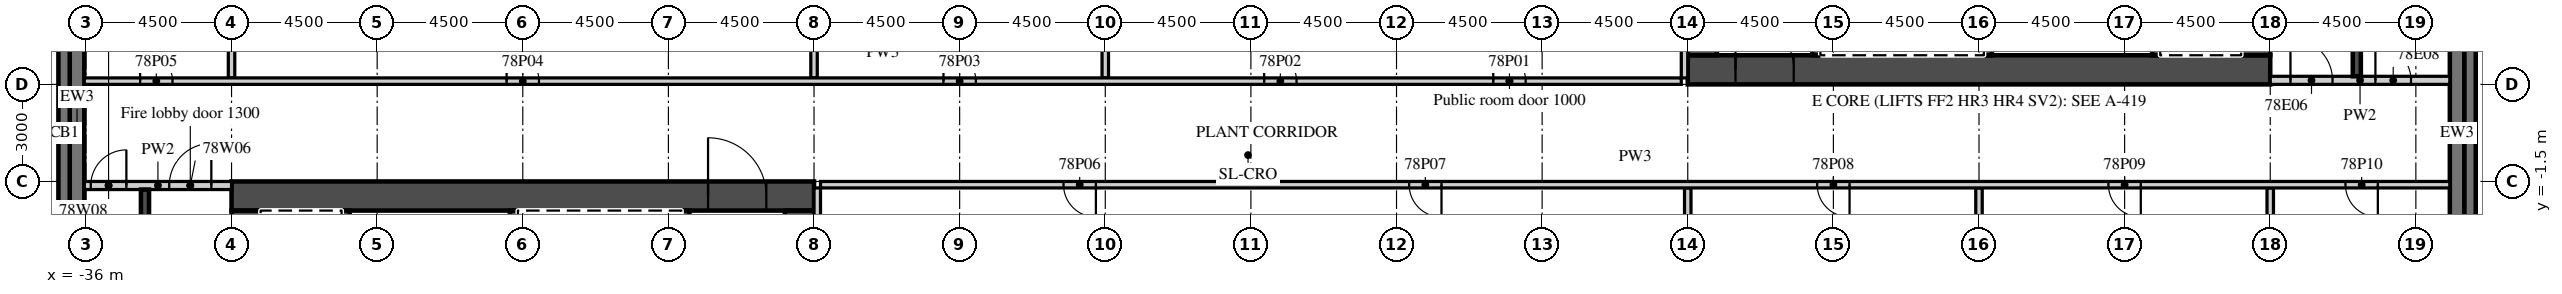
"""IFC4 building model, lengths in metres.
Left out: names, types, materials, properties, quantities, classifications, styles, units other than length and angle.
Written with IfcOpenShell. Run it as: python <this file> out.ifc"""

import sys

from ifc_helpers import new_model, si_unit, direction, frame, frame_2d, origin, place, context, subcontext, project, spatial, polyline, rectangle, outline, extrude, element, fill, save


model = new_model("IFC4")
c1 = context("Model", 3, precision=1e-05, world=origin(), true_north=direction((0.0, 1.0)))
c2 = subcontext(c1, "Body", "Model", "MODEL_VIEW")
j1 = project(units=[si_unit("LENGTHUNIT", "METRE"), si_unit("PLANEANGLEUNIT", "RADIAN")], contexts=[c1])
p1 = place(None, origin())
s1 = spatial("IfcSite", under=j1, at=p1, CompositionType="ELEMENT")
p2 = place(p1, origin())
s2 = spatial("IfcBuilding", under=s1, at=p2, CompositionType="ELEMENT")
p3 = place(p2, frame((0.0, 0.0, 308.1)))
s3 = spatial("IfcBuildingStorey", under=s2, at=p3, CompositionType="ELEMENT", Elevation=308.1)
for number, where, z_axis, x_axis in (
    (1, (37.275, -14.5, 0.0), (0.0, 0.0, 1.0), (0.0, 1.0, 0.0)),
    (2, (-36.275, 14.5, 0.0), (0.0, 0.0, 1.0), (0.0, -1.0, 0.0)),
):
    element("IfcWall", number, at=place(p3, frame(where, z_axis=z_axis, x_axis=x_axis)), inside=s3, PredefinedType="SOLIDWALL", context=c2, shape_type="SweptSolid", body=[
        extrude(rectangle(XDim=29.0, YDim=0.45, at=frame_2d((14.5, 0.0))), origin(), (0.0, 0.0, 1.0), 5.1),
    ])
p4 = place(p3, origin())
e3 = element("IfcWall", 3, at=p4, inside=s3, PredefinedType="SOLIDWALL", context=c2, shape_type="SweptSolid", body=[
    extrude(outline(polyline([(37.5, -3.943), (37.85, -7.578), (37.85, 14.546), (37.5, 14.5), (37.5, -3.943)])), origin(), (0.0, 0.0, 1.0), 2.0),
])
p5 = place(p3, origin())
e4 = element("IfcWall", 4, at=p5, inside=s3, PredefinedType="SOLIDWALL", context=c2, shape_type="SweptSolid", body=[
    extrude(outline(polyline([(-36.5, 14.5), (-36.85, 14.546), (-36.85, -14.546), (-36.5, -14.5), (-36.5, 14.5)])), origin(), (0.0, 0.0, 1.0), 2.0),
])
p6 = place(p3, frame((-31.5, -1.95, 0.0), z_axis=(0.0, 0.0, 1.0), x_axis=(1.0, 0.0, 0.0)))
e5 = element("IfcWall", 5, at=p6, inside=s3, PredefinedType="SHEAR", context=c2, shape_type="SweptSolid", body=[
    extrude(rectangle(XDim=18.0, YDim=0.9, at=frame_2d((9.0, 0.0))), origin(), (0.0, 0.0, 1.0), 5.1),
])
p7 = place(p6, frame((14.725, 0.0, 0.0)))
e6 = element("IfcOpeningElement", 6, at=p7, cuts=e5, PredefinedType="OPENING", context=c2, shape_type="SweptSolid", body=[
    extrude(rectangle(XDim=1.8, YDim=2.1, at=frame_2d((0.9, 1.05))), frame((0.0, 0.46, 0.0), z_axis=(0.0, -1.0, 0.0), x_axis=(1.0, 0.0, 0.0)), (0.0, 0.0, 1.0), 0.92),
])
p8 = place(p3, frame((-31.05, -15.2, 0.0), z_axis=(0.0, 0.0, 1.0), x_axis=(0.0, 1.0, 0.0)))
e7 = element("IfcWall", 7, at=p8, inside=s3, PredefinedType="SHEAR", context=c2, shape_type="SweptSolid", body=[
    extrude(rectangle(XDim=12.8, YDim=0.9, at=frame_2d((6.4, 0.0))), origin(), (0.0, 0.0, 1.0), 5.1),
])
p9 = place(p8, frame((11.5, 0.0, 0.0)))
e8 = element("IfcOpeningElement", 8, at=p9, cuts=e7, PredefinedType="OPENING", context=c2, shape_type="SweptSolid", body=[
    extrude(rectangle(XDim=1.1, YDim=2.1, at=frame_2d((0.55, 1.05))), frame((0.0, 0.46, 0.0), z_axis=(0.0, -1.0, 0.0), x_axis=(1.0, 0.0, 0.0)), (0.0, 0.0, 1.0), 0.92),
])
p10 = place(p3, frame((-13.95, -14.6, 0.0), z_axis=(0.0, 0.0, 1.0), x_axis=(0.0, 1.0, 0.0)))
e9 = element("IfcWall", 9, at=p10, inside=s3, PredefinedType="SHEAR", context=c2, shape_type="SweptSolid", body=[
    extrude(rectangle(XDim=12.2, YDim=0.9, at=frame_2d((6.1, 0.0))), origin(), (0.0, 0.0, 1.0), 5.1),
])
p11 = place(p3, frame((-17.475, -5.55, 0.0), z_axis=(0.0, 0.0, 1.0), x_axis=(0.0, 1.0, 0.0)))
e10 = element("IfcWall", 10, at=p11, inside=s3, PredefinedType="SHEAR", context=c2, shape_type="SweptSolid", body=[
    extrude(rectangle(XDim=3.15, YDim=0.25, at=frame_2d((1.575, 0.0))), origin(), (0.0, 0.0, 1.0), 5.1),
])
for number, where, z_axis, x_axis in (
    (11, (-27.975, -5.3, 0.0), (0.0, 0.0, 1.0), (0.0, 1.0, 0.0)),
    (12, (-22.775, -5.3, 0.0), (0.0, 0.0, 1.0), (0.0, 1.0, 0.0)),
):
    element("IfcWall", number, at=place(p3, frame(where, z_axis=z_axis, x_axis=x_axis)), inside=s3, PredefinedType="SHEAR", context=c2, shape_type="SweptSolid", body=[
        extrude(rectangle(XDim=2.9, YDim=0.25, at=frame_2d((1.45, 0.0))), origin(), (0.0, 0.0, 1.0), 5.1),
    ])
p12 = place(p3, frame((-36.05, -1.625, 0.0), z_axis=(0.0, 0.0, 1.0), x_axis=(1.0, 0.0, 0.0)))
e13 = element("IfcWall", 13, at=p12, inside=s3, PredefinedType="PARTITIONING", context=c2, shape_type="SweptSolid", body=[
    extrude(rectangle(XDim=4.55, YDim=0.25, at=frame_2d((2.275, 0.0))), origin(), (0.0, 0.0, 1.0), 5.1),
])
p13 = place(p12, frame((2.625, 0.0, 0.0)))
e14 = element("IfcOpeningElement", 14, at=p13, cuts=e13, PredefinedType="OPENING", context=c2, shape_type="SweptSolid", body=[
    extrude(rectangle(XDim=1.3, YDim=2.1, at=frame_2d((0.65, 1.05))), frame((0.0, 0.135, 0.0), z_axis=(0.0, -1.0, 0.0), x_axis=(1.0, 0.0, 0.0)), (0.0, 0.0, 1.0), 0.27),
])
p14 = place(p12, frame((0.2, 0.0, 0.0)))
e15 = element("IfcOpeningElement", 15, at=p14, cuts=e13, PredefinedType="OPENING", context=c2, shape_type="SweptSolid", body=[
    extrude(rectangle(XDim=1.1, YDim=2.1, at=frame_2d((0.55, 1.05))), frame((0.0, 0.135, 0.0), z_axis=(0.0, -1.0, 0.0), x_axis=(1.0, 0.0, 0.0)), (0.0, 0.0, 1.0), 0.27),
])
p15 = place(p3, frame((-34.175, -4.05, 0.0), z_axis=(0.0, 0.0, 1.0), x_axis=(0.0, 1.0, 0.0)))
e16 = element("IfcWall", 16, at=p15, inside=s3, PredefinedType="SHEAR", context=c2, shape_type="SweptSolid", body=[
    extrude(rectangle(XDim=2.3, YDim=0.25, at=frame_2d((1.15, 0.0))), origin(), (0.0, 0.0, 1.0), 5.1),
])
p16 = place(p3, frame((13.5, 1.95, 0.0), z_axis=(0.0, 0.0, 1.0), x_axis=(1.0, 0.0, 0.0)))
e17 = element("IfcWall", 17, at=p16, inside=s3, PredefinedType="SHEAR", context=c2, shape_type="SweptSolid", body=[
    extrude(rectangle(XDim=18.0, YDim=0.9, at=frame_2d((9.0, 0.0))), origin(), (0.0, 0.0, 1.0), 5.1),
])
p17 = place(p16, frame((1.475, 0.0, 0.0)))
e18 = element("IfcOpeningElement", 18, at=p17, cuts=e17, PredefinedType="OPENING", context=c2, shape_type="SweptSolid", body=[
    extrude(rectangle(XDim=1.8, YDim=2.1, at=frame_2d((0.9, 1.05))), frame((0.0, 0.46, 0.0), z_axis=(0.0, -1.0, 0.0), x_axis=(1.0, 0.0, 0.0)), (0.0, 0.0, 1.0), 0.92),
])
p18 = place(p3, frame((31.05, 2.4, 0.0), z_axis=(0.0, 0.0, 1.0), x_axis=(0.0, 1.0, 0.0)))
e19 = element("IfcWall", 19, at=p18, inside=s3, PredefinedType="SHEAR", context=c2, shape_type="SweptSolid", body=[
    extrude(rectangle(XDim=12.8, YDim=0.9, at=frame_2d((6.4, 0.0))), origin(), (0.0, 0.0, 1.0), 5.1),
])
p19 = place(p18, frame((0.2, 0.0, 0.0)))
e20 = element("IfcOpeningElement", 20, at=p19, cuts=e19, PredefinedType="OPENING", context=c2, shape_type="SweptSolid", body=[
    extrude(rectangle(XDim=1.1, YDim=2.1, at=frame_2d((0.55, 1.05))), frame((0.0, 0.46, 0.0), z_axis=(0.0, -1.0, 0.0), x_axis=(1.0, 0.0, 0.0)), (0.0, 0.0, 1.0), 0.92),
])
p20 = place(p3, frame((13.95, 2.4, 0.0), z_axis=(0.0, 0.0, 1.0), x_axis=(0.0, 1.0, 0.0)))
e21 = element("IfcWall", 21, at=p20, inside=s3, PredefinedType="SHEAR", context=c2, shape_type="SweptSolid", body=[
    extrude(rectangle(XDim=12.2, YDim=0.9, at=frame_2d((6.1, 0.0))), origin(), (0.0, 0.0, 1.0), 5.1),
])
p21 = place(p3, frame((17.475, 2.4, 0.0), z_axis=(0.0, 0.0, 1.0), x_axis=(0.0, 1.0, 0.0)))
e22 = element("IfcWall", 22, at=p21, inside=s3, PredefinedType="SHEAR", context=c2, shape_type="SweptSolid", body=[
    extrude(rectangle(XDim=3.15, YDim=0.25, at=frame_2d((1.575, 0.0))), origin(), (0.0, 0.0, 1.0), 5.1),
])
for number, where, z_axis, x_axis in (
    (23, (27.975, 2.4, 0.0), (0.0, 0.0, 1.0), (0.0, 1.0, 0.0)),
    (24, (22.775, 2.4, 0.0), (0.0, 0.0, 1.0), (0.0, 1.0, 0.0)),
):
    element("IfcWall", number, at=place(p3, frame(where, z_axis=z_axis, x_axis=x_axis)), inside=s3, PredefinedType="SHEAR", context=c2, shape_type="SweptSolid", body=[
        extrude(rectangle(XDim=2.9, YDim=0.25, at=frame_2d((1.45, 0.0))), origin(), (0.0, 0.0, 1.0), 5.1),
    ])
p22 = place(p3, frame((31.5, 1.625, 0.0), z_axis=(0.0, 0.0, 1.0), x_axis=(1.0, 0.0, 0.0)))
e25 = element("IfcWall", 25, at=p22, inside=s3, PredefinedType="PARTITIONING", context=c2, shape_type="SweptSolid", body=[
    extrude(rectangle(XDim=5.55, YDim=0.25, at=frame_2d((2.775, 0.0))), origin(), (0.0, 0.0, 1.0), 5.1),
])
p23 = place(p22, frame((0.625, 0.0, 0.0)))
e26 = element("IfcOpeningElement", 26, at=p23, cuts=e25, PredefinedType="OPENING", context=c2, shape_type="SweptSolid", body=[
    extrude(rectangle(XDim=1.3, YDim=2.1, at=frame_2d((0.65, 1.05))), frame((0.0, 0.135, 0.0), z_axis=(0.0, -1.0, 0.0), x_axis=(1.0, 0.0, 0.0)), (0.0, 0.0, 1.0), 0.27),
])
p24 = place(p22, frame((3.25, 0.0, 0.0)))
e27 = element("IfcOpeningElement", 27, at=p24, cuts=e25, PredefinedType="OPENING", context=c2, shape_type="SweptSolid", body=[
    extrude(rectangle(XDim=1.1, YDim=2.1, at=frame_2d((0.55, 1.05))), frame((0.0, 0.135, 0.0), z_axis=(0.0, -1.0, 0.0), x_axis=(1.0, 0.0, 0.0)), (0.0, 0.0, 1.0), 0.27),
])
p25 = place(p3, frame((34.175, 1.75, 0.0), z_axis=(0.0, 0.0, 1.0), x_axis=(0.0, 1.0, 0.0)))
e28 = element("IfcWall", 28, at=p25, inside=s3, PredefinedType="SHEAR", context=c2, shape_type="SweptSolid", body=[
    extrude(rectangle(XDim=2.3, YDim=0.25, at=frame_2d((1.15, 0.0))), origin(), (0.0, 0.0, 1.0), 5.1),
])
for number, where, z_axis, x_axis in (
    (29, (-4.5, 1.7, 0.0), (0.0, 0.0, 1.0), (0.0, 1.0, 0.0)),
    (30, (-13.5, 1.7, 0.0), (0.0, 0.0, 1.0), (0.0, 1.0, 0.0)),
    (31, (-31.5, 1.7, 0.0), (0.0, 0.0, 1.0), (0.0, 1.0, 0.0)),
):
    element("IfcWall", number, at=place(p3, frame(where, z_axis=z_axis, x_axis=x_axis)), inside=s3, PredefinedType="PARTITIONING", context=c2, shape_type="SweptSolid", body=[
        extrude(rectangle(XDim=16.35, YDim=0.2, at=frame_2d((8.175, 0.0))), origin(), (0.0, 0.0, 1.0), 5.1),
    ])
p26 = place(p3, frame((-36.05, 1.6, 0.0), z_axis=(0.0, 0.0, 1.0), x_axis=(1.0, 0.0, 0.0)))
e32 = element("IfcWall", 32, at=p26, inside=s3, PredefinedType="PARTITIONING", context=c2, shape_type="SweptSolid", body=[
    extrude(rectangle(XDim=49.35, YDim=0.2, at=frame_2d((24.675, 0.0))), origin(), (0.0, 0.0, 1.0), 4.6),
])
p27 = place(p26, frame((43.54, 0.0, 0.0)))
e33 = element("IfcOpeningElement", 33, at=p27, cuts=e32, PredefinedType="OPENING", context=c2, shape_type="SweptSolid", body=[
    extrude(rectangle(XDim=1.0, YDim=2.1, at=frame_2d((0.5, 1.05))), frame((0.0, 0.11, 0.0), z_axis=(0.0, -1.0, 0.0), x_axis=(1.0, 0.0, 0.0)), (0.0, 0.0, 1.0), 0.22),
])
p28 = place(p26, frame((36.46, 0.0, 0.0)))
e34 = element("IfcOpeningElement", 34, at=p28, cuts=e32, PredefinedType="OPENING", context=c2, shape_type="SweptSolid", body=[
    extrude(rectangle(XDim=1.0, YDim=2.1, at=frame_2d((0.5, 1.05))), frame((0.0, 0.11, 0.0), z_axis=(0.0, -1.0, 0.0), x_axis=(1.0, 0.0, 0.0)), (0.0, 0.0, 1.0), 0.22),
])
p29 = place(p26, frame((26.55, 0.0, 0.0)))
e35 = element("IfcOpeningElement", 35, at=p29, cuts=e32, PredefinedType="OPENING", context=c2, shape_type="SweptSolid", body=[
    extrude(rectangle(XDim=1.0, YDim=2.1, at=frame_2d((0.5, 1.05))), frame((0.0, 0.11, 0.0), z_axis=(0.0, -1.0, 0.0), x_axis=(1.0, 0.0, 0.0)), (0.0, 0.0, 1.0), 0.22),
])
p30 = place(p26, frame((13.05, 0.0, 0.0)))
e36 = element("IfcOpeningElement", 36, at=p30, cuts=e32, PredefinedType="OPENING", context=c2, shape_type="SweptSolid", body=[
    extrude(rectangle(XDim=1.0, YDim=2.1, at=frame_2d((0.5, 1.05))), frame((0.0, 0.11, 0.0), z_axis=(0.0, -1.0, 0.0), x_axis=(1.0, 0.0, 0.0)), (0.0, 0.0, 1.0), 0.22),
])
p31 = place(p26, frame((1.725, 0.0, 0.0)))
e37 = element("IfcOpeningElement", 37, at=p31, cuts=e32, PredefinedType="OPENING", context=c2, shape_type="SweptSolid", body=[
    extrude(rectangle(XDim=1.0, YDim=2.1, at=frame_2d((0.5, 1.05))), frame((0.0, 0.11, 0.0), z_axis=(0.0, -1.0, 0.0), x_axis=(1.0, 0.0, 0.0)), (0.0, 0.0, 1.0), 0.22),
])
for number, where, z_axis, x_axis in (
    (38, (13.4, 1.7, 0.0), (0.0, 0.0, 1.0), (0.0, 1.0, 0.0)),
    (39, (13.5, -18.05, 0.0), (0.0, 0.0, 1.0), (0.0, 1.0, 0.0)),
    (40, (22.5, -18.05, 0.0), (0.0, 0.0, 1.0), (0.0, 1.0, 0.0)),
    (41, (31.5, -18.05, 0.0), (0.0, 0.0, 1.0), (0.0, 1.0, 0.0)),
):
    element("IfcWall", number, at=place(p3, frame(where, z_axis=z_axis, x_axis=x_axis)), inside=s3, PredefinedType="PARTITIONING", context=c2, shape_type="SweptSolid", body=[
        extrude(rectangle(XDim=16.35, YDim=0.2, at=frame_2d((8.175, 0.0))), origin(), (0.0, 0.0, 1.0), 5.1),
    ])
p32 = place(p3, frame((-13.3, -1.6, 0.0), z_axis=(0.0, 0.0, 1.0), x_axis=(1.0, 0.0, 0.0)))
e42 = element("IfcWall", 42, at=p32, inside=s3, PredefinedType="PARTITIONING", context=c2, shape_type="SweptSolid", body=[
    extrude(rectangle(XDim=50.35, YDim=0.2, at=frame_2d((25.175, 0.0))), origin(), (0.0, 0.0, 1.0), 4.6),
])
p33 = place(p32, frame((7.51, 0.0, 0.0)))
e43 = element("IfcOpeningElement", 43, at=p33, cuts=e42, PredefinedType="OPENING", context=c2, shape_type="SweptSolid", body=[
    extrude(rectangle(XDim=1.0, YDim=2.1, at=frame_2d((0.5, 1.05))), frame((0.0, 0.11, 0.0), z_axis=(0.0, -1.0, 0.0), x_axis=(1.0, 0.0, 0.0)), (0.0, 0.0, 1.0), 0.22),
])
p34 = place(p32, frame((18.19, 0.0, 0.0)))
e44 = element("IfcOpeningElement", 44, at=p34, cuts=e42, PredefinedType="OPENING", context=c2, shape_type="SweptSolid", body=[
    extrude(rectangle(XDim=1.0, YDim=2.1, at=frame_2d((0.5, 1.05))), frame((0.0, 0.11, 0.0), z_axis=(0.0, -1.0, 0.0), x_axis=(1.0, 0.0, 0.0)), (0.0, 0.0, 1.0), 0.22),
])
p35 = place(p32, frame((30.8, 0.0, 0.0)))
e45 = element("IfcOpeningElement", 45, at=p35, cuts=e42, PredefinedType="OPENING", context=c2, shape_type="SweptSolid", body=[
    extrude(rectangle(XDim=1.0, YDim=2.1, at=frame_2d((0.5, 1.05))), frame((0.0, 0.11, 0.0), z_axis=(0.0, -1.0, 0.0), x_axis=(1.0, 0.0, 0.0)), (0.0, 0.0, 1.0), 0.22),
])
p36 = place(p32, frame((39.8, 0.0, 0.0)))
e46 = element("IfcOpeningElement", 46, at=p36, cuts=e42, PredefinedType="OPENING", context=c2, shape_type="SweptSolid", body=[
    extrude(rectangle(XDim=1.0, YDim=2.1, at=frame_2d((0.5, 1.05))), frame((0.0, 0.11, 0.0), z_axis=(0.0, -1.0, 0.0), x_axis=(1.0, 0.0, 0.0)), (0.0, 0.0, 1.0), 0.22),
])
p37 = place(p32, frame((47.125, 0.0, 0.0)))
e47 = element("IfcOpeningElement", 47, at=p37, cuts=e42, PredefinedType="OPENING", context=c2, shape_type="SweptSolid", body=[
    extrude(rectangle(XDim=1.0, YDim=2.1, at=frame_2d((0.5, 1.05))), frame((0.0, 0.11, 0.0), z_axis=(0.0, -1.0, 0.0), x_axis=(1.0, 0.0, 0.0)), (0.0, 0.0, 1.0), 0.22),
])
p38 = place(p3, frame((-13.4, -18.05, 0.0), z_axis=(0.0, 0.0, 1.0), x_axis=(0.0, 1.0, 0.0)))
e48 = element("IfcWall", 48, at=p38, inside=s3, PredefinedType="PARTITIONING", context=c2, shape_type="SweptSolid", body=[
    extrude(rectangle(XDim=16.35, YDim=0.2, at=frame_2d((8.175, 0.0))), origin(), (0.0, 0.0, 1.0), 5.1),
])
p39 = place(p7, origin())
e49 = element("IfcDoor", 49, at=p39, inside=s3, OperationType="DOUBLE_DOOR_DOUBLE_SWING", PredefinedType="DOOR", context=c2, shape_type="SweptSolid", body=[
    extrude(rectangle(XDim=1.8, YDim=2.1, at=frame_2d((0.9, 1.05))), frame((0.0, 0.025, 0.0), z_axis=(0.0, -1.0, 0.0), x_axis=(1.0, 0.0, 0.0)), (0.0, 0.0, 1.0), 0.05),
])
fill(e6, e49)
p40 = place(p13, origin())
e50 = element("IfcDoor", 50, at=p40, inside=s3, OperationType="SINGLE_SWING_RIGHT", PredefinedType="DOOR", context=c2, shape_type="SweptSolid", body=[
    extrude(rectangle(XDim=1.3, YDim=2.1, at=frame_2d((0.65, 1.05))), frame((0.0, 0.025, 0.0), z_axis=(0.0, -1.0, 0.0), x_axis=(1.0, 0.0, 0.0)), (0.0, 0.0, 1.0), 0.05),
])
fill(e14, e50)
p41 = place(p14, origin())
e51 = element("IfcDoor", 51, at=p41, inside=s3, OperationType="SINGLE_SWING_RIGHT", PredefinedType="DOOR", context=c2, shape_type="SweptSolid", body=[
    extrude(rectangle(XDim=1.1, YDim=2.1, at=frame_2d((0.55, 1.05))), frame((0.0, 0.025, 0.0), z_axis=(0.0, -1.0, 0.0), x_axis=(1.0, 0.0, 0.0)), (0.0, 0.0, 1.0), 0.05),
])
fill(e15, e51)
p42 = place(p17, origin())
e52 = element("IfcDoor", 52, at=p42, inside=s3, OperationType="DOUBLE_DOOR_DOUBLE_SWING", PredefinedType="DOOR", context=c2, shape_type="SweptSolid", body=[
    extrude(rectangle(XDim=1.8, YDim=2.1, at=frame_2d((0.9, 1.05))), frame((0.0, 0.025, 0.0), z_axis=(0.0, -1.0, 0.0), x_axis=(1.0, 0.0, 0.0)), (0.0, 0.0, 1.0), 0.05),
])
fill(e18, e52)
p43 = place(p23, origin())
e53 = element("IfcDoor", 53, at=p43, inside=s3, OperationType="SINGLE_SWING_LEFT", PredefinedType="DOOR", context=c2, shape_type="SweptSolid", body=[
    extrude(rectangle(XDim=1.3, YDim=2.1, at=frame_2d((0.65, 1.05))), frame((0.0, 0.025, 0.0), z_axis=(0.0, -1.0, 0.0), x_axis=(1.0, 0.0, 0.0)), (0.0, 0.0, 1.0), 0.05),
])
fill(e26, e53)
p44 = place(p24, origin())
e54 = element("IfcDoor", 54, at=p44, inside=s3, OperationType="SINGLE_SWING_LEFT", PredefinedType="DOOR", context=c2, shape_type="SweptSolid", body=[
    extrude(rectangle(XDim=1.1, YDim=2.1, at=frame_2d((0.55, 1.05))), frame((0.0, 0.025, 0.0), z_axis=(0.0, -1.0, 0.0), x_axis=(1.0, 0.0, 0.0)), (0.0, 0.0, 1.0), 0.05),
])
fill(e27, e54)
p45 = place(p27, origin())
e55 = element("IfcDoor", 55, at=p45, inside=s3, OperationType="SINGLE_SWING_LEFT", PredefinedType="DOOR", context=c2, shape_type="SweptSolid", body=[
    extrude(rectangle(XDim=1.0, YDim=2.1, at=frame_2d((0.5, 1.05))), frame((0.0, 0.025, 0.0), z_axis=(0.0, -1.0, 0.0), x_axis=(1.0, 0.0, 0.0)), (0.0, 0.0, 1.0), 0.05),
])
fill(e33, e55)
p46 = place(p28, origin())
e56 = element("IfcDoor", 56, at=p46, inside=s3, OperationType="SINGLE_SWING_LEFT", PredefinedType="DOOR", context=c2, shape_type="SweptSolid", body=[
    extrude(rectangle(XDim=1.0, YDim=2.1, at=frame_2d((0.5, 1.05))), frame((0.0, 0.025, 0.0), z_axis=(0.0, -1.0, 0.0), x_axis=(1.0, 0.0, 0.0)), (0.0, 0.0, 1.0), 0.05),
])
fill(e34, e56)
p47 = place(p29, origin())
e57 = element("IfcDoor", 57, at=p47, inside=s3, OperationType="SINGLE_SWING_LEFT", PredefinedType="DOOR", context=c2, shape_type="SweptSolid", body=[
    extrude(rectangle(XDim=1.0, YDim=2.1, at=frame_2d((0.5, 1.05))), frame((0.0, 0.025, 0.0), z_axis=(0.0, -1.0, 0.0), x_axis=(1.0, 0.0, 0.0)), (0.0, 0.0, 1.0), 0.05),
])
fill(e35, e57)
p48 = place(p30, origin())
e58 = element("IfcDoor", 58, at=p48, inside=s3, OperationType="SINGLE_SWING_LEFT", PredefinedType="DOOR", context=c2, shape_type="SweptSolid", body=[
    extrude(rectangle(XDim=1.0, YDim=2.1, at=frame_2d((0.5, 1.05))), frame((0.0, 0.025, 0.0), z_axis=(0.0, -1.0, 0.0), x_axis=(1.0, 0.0, 0.0)), (0.0, 0.0, 1.0), 0.05),
])
fill(e36, e58)
p49 = place(p31, origin())
e59 = element("IfcDoor", 59, at=p49, inside=s3, OperationType="SINGLE_SWING_LEFT", PredefinedType="DOOR", context=c2, shape_type="SweptSolid", body=[
    extrude(rectangle(XDim=1.0, YDim=2.1, at=frame_2d((0.5, 1.05))), frame((0.0, 0.025, 0.0), z_axis=(0.0, -1.0, 0.0), x_axis=(1.0, 0.0, 0.0)), (0.0, 0.0, 1.0), 0.05),
])
fill(e37, e59)
p50 = place(p33, origin())
e60 = element("IfcDoor", 60, at=p50, inside=s3, OperationType="SINGLE_SWING_RIGHT", PredefinedType="DOOR", context=c2, shape_type="SweptSolid", body=[
    extrude(rectangle(XDim=1.0, YDim=2.1, at=frame_2d((0.5, 1.05))), frame((0.0, 0.025, 0.0), z_axis=(0.0, -1.0, 0.0), x_axis=(1.0, 0.0, 0.0)), (0.0, 0.0, 1.0), 0.05),
])
fill(e43, e60)
p51 = place(p34, origin())
e61 = element("IfcDoor", 61, at=p51, inside=s3, OperationType="SINGLE_SWING_RIGHT", PredefinedType="DOOR", context=c2, shape_type="SweptSolid", body=[
    extrude(rectangle(XDim=1.0, YDim=2.1, at=frame_2d((0.5, 1.05))), frame((0.0, 0.025, 0.0), z_axis=(0.0, -1.0, 0.0), x_axis=(1.0, 0.0, 0.0)), (0.0, 0.0, 1.0), 0.05),
])
fill(e44, e61)
p52 = place(p35, origin())
e62 = element("IfcDoor", 62, at=p52, inside=s3, OperationType="SINGLE_SWING_RIGHT", PredefinedType="DOOR", context=c2, shape_type="SweptSolid", body=[
    extrude(rectangle(XDim=1.0, YDim=2.1, at=frame_2d((0.5, 1.05))), frame((0.0, 0.025, 0.0), z_axis=(0.0, -1.0, 0.0), x_axis=(1.0, 0.0, 0.0)), (0.0, 0.0, 1.0), 0.05),
])
fill(e45, e62)
p53 = place(p36, origin())
e63 = element("IfcDoor", 63, at=p53, inside=s3, OperationType="SINGLE_SWING_RIGHT", PredefinedType="DOOR", context=c2, shape_type="SweptSolid", body=[
    extrude(rectangle(XDim=1.0, YDim=2.1, at=frame_2d((0.5, 1.05))), frame((0.0, 0.025, 0.0), z_axis=(0.0, -1.0, 0.0), x_axis=(1.0, 0.0, 0.0)), (0.0, 0.0, 1.0), 0.05),
])
fill(e46, e63)
p54 = place(p37, origin())
e64 = element("IfcDoor", 64, at=p54, inside=s3, OperationType="SINGLE_SWING_RIGHT", PredefinedType="DOOR", context=c2, shape_type="SweptSolid", body=[
    extrude(rectangle(XDim=1.0, YDim=2.1, at=frame_2d((0.5, 1.05))), frame((0.0, 0.025, 0.0), z_axis=(0.0, -1.0, 0.0), x_axis=(1.0, 0.0, 0.0)), (0.0, 0.0, 1.0), 0.05),
])
fill(e47, e64)
save(model, sys.argv[1])
